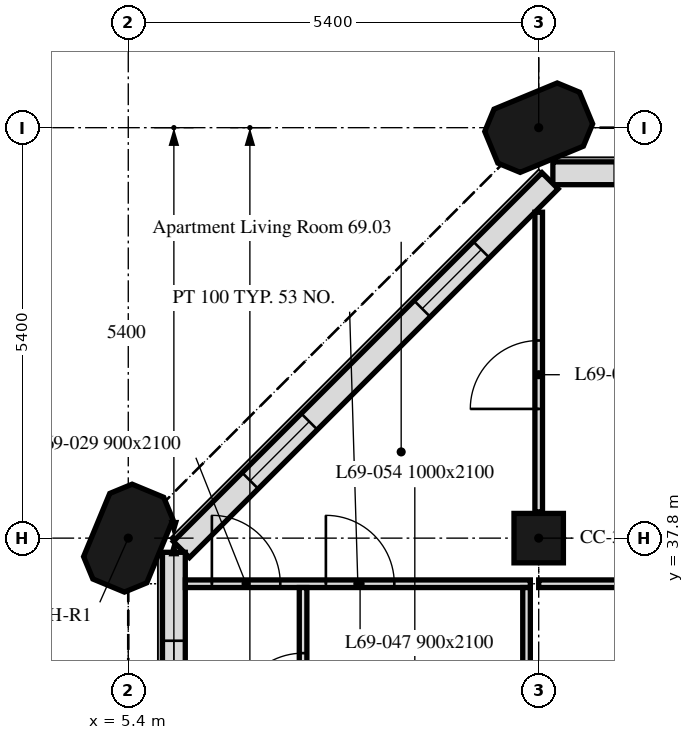
"""IFC4 building model, lengths in metres.
Left out: names, types, materials, properties, quantities, classifications, styles, units other than length and angle.
Written with IfcOpenShell. Run it as: python <this file> out.ifc"""

import sys

from ifc_helpers import new_model, si_unit, direction, frame, frame_2d, origin, origin_2d, place, context, subcontext, project, spatial, polyline, rectangle, outline, extrude, element, fill, save


model = new_model("IFC4")
c1 = context("Model", 3, precision=1e-05, world=origin(), true_north=direction((0.0, 1.0)))
c2 = subcontext(c1, "Body", "Model", "MODEL_VIEW")
j1 = project(units=[si_unit("LENGTHUNIT", "METRE"), si_unit("PLANEANGLEUNIT", "RADIAN")], contexts=[c1])
p1 = place(None, origin())
s1 = spatial("IfcSite", under=j1, at=p1, CompositionType="ELEMENT")
p2 = place(p1, origin())
s2 = spatial("IfcBuilding", under=s1, at=p2, CompositionType="ELEMENT")
p3 = place(p2, frame((0.0, 0.0, 281.8)))
s3 = spatial("IfcBuildingStorey", under=s2, at=p3, CompositionType="ELEMENT", Elevation=281.8)
p4 = place(p3, frame((5.4, 37.8, 0.0), z_axis=(0.0, 0.0, 1.0), x_axis=(0.382683432365, 0.923879532511, 0.0)))
e1 = element("IfcColumn", 1, at=p4, inside=s3, PredefinedType="COLUMN", context=c2, shape_type="SweptSolid", body=[
    extrude(outline(polyline([(-0.45, -0.45), (0.45, -0.45), (0.675, -0.225), (0.675, 0.225), (0.45, 0.45), (-0.45, 0.45), (-0.675, 0.225), (-0.675, -0.225), (-0.45, -0.45)])), origin(), (0.0, 0.0, 1.0), 3.0),
])
p5 = place(p3, frame((10.8, 37.8, 0.0), z_axis=(0.0, 0.0, 1.0), x_axis=(1.0, 0.0, 0.0)))
e2 = element("IfcColumn", 2, at=p5, inside=s3, PredefinedType="COLUMN", context=c2, shape_type="SweptSolid", body=[
    extrude(rectangle(XDim=0.65, YDim=0.65, at=origin_2d()), origin(), (0.0, 0.0, 1.0), 3.0),
])
p6 = place(p3, frame((10.8, 43.2, 0.0), z_axis=(0.0, 0.0, 1.0), x_axis=(0.923879532511, 0.382683432365, 0.0)))
e3 = element("IfcColumn", 3, at=p6, inside=s3, PredefinedType="COLUMN", context=c2, shape_type="SweptSolid", body=[
    extrude(outline(polyline([(-0.45, -0.45), (0.45, -0.45), (0.675, -0.225), (0.675, 0.225), (0.45, 0.45), (-0.45, 0.45), (-0.675, 0.225), (-0.675, -0.225), (-0.45, -0.45)])), origin(), (0.0, 0.0, 1.0), 3.0),
])
p7 = place(p3, frame((43.014, 42.6, 0.0), z_axis=(0.0, 0.0, 1.0), x_axis=(-1.0, 0.0, 0.0)))
e4 = element("IfcWall", 4, at=p7, inside=s3, PredefinedType="SOLIDWALL", context=c2, shape_type="SweptSolid", body=[
    extrude(rectangle(XDim=32.027, YDim=0.3, at=frame_2d((16.014, 0.0))), origin(), (0.0, 0.0, 1.0), 3.0),
])
p8 = place(p7, frame((2.764, 0.0, 0.9)))
e5 = element("IfcOpeningElement", 5, at=p8, cuts=e4, PredefinedType="OPENING", context=c2, shape_type="SweptSolid", body=[
    extrude(rectangle(XDim=1.1, YDim=1.7, at=frame_2d((0.55, 0.85))), frame((0.0, 0.16, 0.0), z_axis=(0.0, -1.0, 0.0), x_axis=(1.0, 0.0, 0.0)), (0.0, 0.0, 1.0), 0.32),
])
p9 = place(p7, frame((6.214, 0.0, 0.9)))
e6 = element("IfcOpeningElement", 6, at=p9, cuts=e4, PredefinedType="OPENING", context=c2, shape_type="SweptSolid", body=[
    extrude(rectangle(XDim=3.4, YDim=1.7, at=frame_2d((1.7, 0.85))), frame((0.0, 0.16, 0.0), z_axis=(0.0, -1.0, 0.0), x_axis=(1.0, 0.0, 0.0)), (0.0, 0.0, 1.0), 0.32),
])
p10 = place(p7, frame((13.564, 0.0, 0.9)))
e7 = element("IfcOpeningElement", 7, at=p10, cuts=e4, PredefinedType="OPENING", context=c2, shape_type="SweptSolid", body=[
    extrude(rectangle(XDim=1.1, YDim=1.7, at=frame_2d((0.55, 0.85))), frame((0.0, 0.16, 0.0), z_axis=(0.0, -1.0, 0.0), x_axis=(1.0, 0.0, 0.0)), (0.0, 0.0, 1.0), 0.32),
])
p11 = place(p7, frame((17.014, 0.0, 0.9)))
e8 = element("IfcOpeningElement", 8, at=p11, cuts=e4, PredefinedType="OPENING", context=c2, shape_type="SweptSolid", body=[
    extrude(rectangle(XDim=3.4, YDim=1.7, at=frame_2d((1.7, 0.85))), frame((0.0, 0.16, 0.0), z_axis=(0.0, -1.0, 0.0), x_axis=(1.0, 0.0, 0.0)), (0.0, 0.0, 1.0), 0.32),
])
p12 = place(p7, frame((24.364, 0.0, 0.9)))
e9 = element("IfcOpeningElement", 9, at=p12, cuts=e4, PredefinedType="OPENING", context=c2, shape_type="SweptSolid", body=[
    extrude(rectangle(XDim=1.1, YDim=1.7, at=frame_2d((0.55, 0.85))), frame((0.0, 0.16, 0.0), z_axis=(0.0, -1.0, 0.0), x_axis=(1.0, 0.0, 0.0)), (0.0, 0.0, 1.0), 0.32),
])
p13 = place(p7, frame((27.814, 0.0, 0.9)))
e10 = element("IfcOpeningElement", 10, at=p13, cuts=e4, PredefinedType="OPENING", context=c2, shape_type="SweptSolid", body=[
    extrude(rectangle(XDim=3.4, YDim=1.7, at=frame_2d((1.7, 0.85))), frame((0.0, 0.16, 0.0), z_axis=(0.0, -1.0, 0.0), x_axis=(1.0, 0.0, 0.0)), (0.0, 0.0, 1.0), 0.32),
])
p14 = place(p3, frame((10.949, 42.501, 0.0), z_axis=(0.0, 0.0, 1.0), x_axis=(-0.707106781187, -0.707106781187, 0.0)))
e11 = element("IfcWall", 11, at=p14, inside=s3, PredefinedType="SOLIDWALL", context=c2, shape_type="SweptSolid", body=[
    extrude(rectangle(XDim=6.86, YDim=0.3, at=frame_2d((3.43, 0.0))), origin(), (0.0, 0.0, 1.0), 3.0),
])
p15 = place(p14, frame((1.28, 0.0, 0.9)))
e12 = element("IfcOpeningElement", 12, at=p15, cuts=e11, PredefinedType="OPENING", context=c2, shape_type="SweptSolid", body=[
    extrude(rectangle(XDim=1.1, YDim=1.7, at=frame_2d((0.55, 0.85))), frame((0.0, 0.16, 0.0), z_axis=(0.0, -1.0, 0.0), x_axis=(1.0, 0.0, 0.0)), (0.0, 0.0, 1.0), 0.32),
])
p16 = place(p14, frame((4.48, 0.0, 0.9)))
e13 = element("IfcOpeningElement", 13, at=p16, cuts=e11, PredefinedType="OPENING", context=c2, shape_type="SweptSolid", body=[
    extrude(rectangle(XDim=1.1, YDim=1.7, at=frame_2d((0.55, 0.85))), frame((0.0, 0.16, 0.0), z_axis=(0.0, -1.0, 0.0), x_axis=(1.0, 0.0, 0.0)), (0.0, 0.0, 1.0), 0.32),
])
p17 = place(p3, frame((6.0, 37.614, 0.0), z_axis=(0.0, 0.0, 1.0), x_axis=(0.0, -1.0, 0.0)))
e14 = element("IfcWall", 14, at=p17, inside=s3, PredefinedType="SOLIDWALL", context=c2, shape_type="SweptSolid", body=[
    extrude(rectangle(XDim=5.214, YDim=0.3, at=frame_2d((2.607, 0.0))), origin(), (0.0, 0.0, 1.0), 3.0),
])
p18 = place(p17, frame((1.164, 0.0, 0.9)))
e15 = element("IfcOpeningElement", 15, at=p18, cuts=e14, PredefinedType="OPENING", context=c2, shape_type="SweptSolid", body=[
    extrude(rectangle(XDim=1.1, YDim=1.7, at=frame_2d((0.55, 0.85))), frame((0.0, 0.16, 0.0), z_axis=(0.0, -1.0, 0.0), x_axis=(1.0, 0.0, 0.0)), (0.0, 0.0, 1.0), 0.32),
])
p19 = place(p17, frame((3.139, 0.0, 0.9)))
e16 = element("IfcOpeningElement", 16, at=p19, cuts=e14, PredefinedType="OPENING", context=c2, shape_type="SweptSolid", body=[
    extrude(rectangle(XDim=0.65, YDim=1.7, at=frame_2d((0.325, 0.85))), frame((0.0, 0.16, 0.0), z_axis=(0.0, -1.0, 0.0), x_axis=(1.0, 0.0, 0.0)), (0.0, 0.0, 1.0), 0.32),
])
p20 = place(p3, frame((6.151, 37.2, 0.0), z_axis=(0.0, 0.0, 1.0), x_axis=(1.0, 0.0, 0.0)))
e17 = element("IfcWall", 17, at=p20, inside=s3, PredefinedType="PARTITIONING", context=c2, shape_type="SweptSolid", body=[
    extrude(rectangle(XDim=4.539, YDim=0.1, at=frame_2d((2.27, 0.0))), origin(), (0.0, 0.0, 1.0), 3.0),
])
p21 = place(p20, frame((0.349, 0.0, 0.0)))
e18 = element("IfcOpeningElement", 18, at=p21, cuts=e17, PredefinedType="OPENING", context=c2, shape_type="SweptSolid", body=[
    extrude(rectangle(XDim=0.9, YDim=2.1, at=frame_2d((0.45, 1.05))), frame((0.0, 0.05, 0.0), z_axis=(0.0, -1.0, 0.0), x_axis=(1.0, 0.0, 0.0)), (0.0, 0.0, 1.0), 0.1),
])
p22 = place(p20, frame((1.849, 0.0, 0.0)))
e19 = element("IfcOpeningElement", 19, at=p22, cuts=e17, PredefinedType="OPENING", context=c2, shape_type="SweptSolid", body=[
    extrude(rectangle(XDim=0.9, YDim=2.1, at=frame_2d((0.45, 1.05))), frame((0.0, 0.05, 0.0), z_axis=(0.0, -1.0, 0.0), x_axis=(1.0, 0.0, 0.0)), (0.0, 0.0, 1.0), 0.1),
])
p23 = place(p3, frame((10.8, 38.145, 0.0), z_axis=(0.0, 0.0, 1.0), x_axis=(0.0, 1.0, 0.0)))
e20 = element("IfcWall", 20, at=p23, inside=s3, PredefinedType="PARTITIONING", context=c2, shape_type="SweptSolid", body=[
    extrude(rectangle(XDim=3.943, YDim=0.1, at=frame_2d((1.971, 0.0))), origin(), (0.0, 0.0, 1.0), 3.0),
])
p24 = place(p23, frame((1.355, 0.0, 0.0)))
e21 = element("IfcOpeningElement", 21, at=p24, cuts=e20, PredefinedType="OPENING", context=c2, shape_type="SweptSolid", body=[
    extrude(rectangle(XDim=0.9, YDim=2.1, at=frame_2d((0.45, 1.05))), frame((0.0, 0.05, 0.0), z_axis=(0.0, -1.0, 0.0), x_axis=(1.0, 0.0, 0.0)), (0.0, 0.0, 1.0), 0.1),
])
p25 = place(p3, frame((7.7, 34.725, 0.0), z_axis=(0.0, 0.0, 1.0), x_axis=(0.0, 1.0, 0.0)))
e22 = element("IfcWall", 22, at=p25, inside=s3, PredefinedType="PARTITIONING", context=c2, shape_type="SweptSolid", body=[
    extrude(rectangle(XDim=2.425, YDim=0.1, at=frame_2d((1.212, 0.0))), origin(), (0.0, 0.0, 1.0), 3.0),
])
p26 = place(p25, frame((0.662, 0.0, 0.0)))
e23 = element("IfcOpeningElement", 23, at=p26, cuts=e22, PredefinedType="OPENING", context=c2, shape_type="SweptSolid", body=[
    extrude(rectangle(XDim=0.9, YDim=2.1, at=frame_2d((0.45, 1.05))), frame((0.0, 0.05, 0.0), z_axis=(0.0, -1.0, 0.0), x_axis=(1.0, 0.0, 0.0)), (0.0, 0.0, 1.0), 0.1),
])
p27 = place(p3, frame((10.64, 34.725, 0.0), z_axis=(0.0, 0.0, 1.0), x_axis=(0.0, 1.0, 0.0)))
e24 = element("IfcWall", 24, at=p27, inside=s3, PredefinedType="PARTITIONING", context=c2, shape_type="SweptSolid", body=[
    extrude(rectangle(XDim=2.425, YDim=0.1, at=frame_2d((1.212, 0.0))), origin(), (0.0, 0.0, 1.0), 3.0),
])
p28 = place(p27, frame((0.25, 0.0, 0.0)))
e25 = element("IfcOpeningElement", 25, at=p28, cuts=e24, PredefinedType="OPENING", context=c2, shape_type="SweptSolid", body=[
    extrude(rectangle(XDim=0.9, YDim=2.1, at=frame_2d((0.45, 1.05))), frame((0.0, 0.05, 0.0), z_axis=(0.0, -1.0, 0.0), x_axis=(1.0, 0.0, 0.0)), (0.0, 0.0, 1.0), 0.1),
])
p29 = place(p3, frame((10.8, 37.2, 0.0), z_axis=(0.0, 0.0, 1.0), x_axis=(1.0, 0.0, 0.0)))
e26 = element("IfcWall", 26, at=p29, inside=s3, PredefinedType="PARTITIONING", context=c2, shape_type="SweptSolid", body=[
    extrude(rectangle(XDim=16.2, YDim=0.1, at=frame_2d((8.1, 0.0))), origin(), (0.0, 0.0, 1.0), 3.0),
])
p30 = place(p29, frame((2.995, 0.0, 0.0)))
e27 = element("IfcOpeningElement", 27, at=p30, cuts=e26, PredefinedType="OPENING", context=c2, shape_type="SweptSolid", body=[
    extrude(rectangle(XDim=0.9, YDim=2.1, at=frame_2d((0.45, 1.05))), frame((0.0, 0.05, 0.0), z_axis=(0.0, -1.0, 0.0), x_axis=(1.0, 0.0, 0.0)), (0.0, 0.0, 1.0), 0.1),
])
p31 = place(p29, frame((13.996, 0.0, 0.0)))
e28 = element("IfcOpeningElement", 28, at=p31, cuts=e26, PredefinedType="OPENING", context=c2, shape_type="SweptSolid", body=[
    extrude(rectangle(XDim=0.9, YDim=2.1, at=frame_2d((0.45, 1.05))), frame((0.0, 0.05, 0.0), z_axis=(0.0, -1.0, 0.0), x_axis=(1.0, 0.0, 0.0)), (0.0, 0.0, 1.0), 0.1),
])
p32 = place(p29, frame((6.928, 0.0, 0.0)))
e29 = element("IfcOpeningElement", 29, at=p32, cuts=e26, PredefinedType="OPENING", context=c2, shape_type="SweptSolid", body=[
    extrude(rectangle(XDim=0.9, YDim=2.1, at=frame_2d((0.45, 1.05))), frame((0.0, 0.05, 0.0), z_axis=(0.0, -1.0, 0.0), x_axis=(1.0, 0.0, 0.0)), (0.0, 0.0, 1.0), 0.1),
])
p33 = place(p29, frame((8.428, 0.0, 0.0)))
e30 = element("IfcOpeningElement", 30, at=p33, cuts=e26, PredefinedType="OPENING", context=c2, shape_type="SweptSolid", body=[
    extrude(rectangle(XDim=0.9, YDim=2.1, at=frame_2d((0.45, 1.05))), frame((0.0, 0.05, 0.0), z_axis=(0.0, -1.0, 0.0), x_axis=(1.0, 0.0, 0.0)), (0.0, 0.0, 1.0), 0.1),
])
p34 = place(p15, origin())
e31 = element("IfcWindow", 31, at=p34, inside=s3, PartitioningType="SINGLE_PANEL", PredefinedType="WINDOW", context=c2, shape_type="SweptSolid", body=[
    extrude(rectangle(XDim=1.1, YDim=1.7, at=frame_2d((0.55, 0.85))), frame((0.0, 0.03, 0.0), z_axis=(0.0, -1.0, 0.0), x_axis=(1.0, 0.0, 0.0)), (0.0, 0.0, 1.0), 0.06),
])
fill(e12, e31)
p35 = place(p16, origin())
e32 = element("IfcWindow", 32, at=p35, inside=s3, PartitioningType="SINGLE_PANEL", PredefinedType="WINDOW", context=c2, shape_type="SweptSolid", body=[
    extrude(rectangle(XDim=1.1, YDim=1.7, at=frame_2d((0.55, 0.85))), frame((0.0, 0.03, 0.0), z_axis=(0.0, -1.0, 0.0), x_axis=(1.0, 0.0, 0.0)), (0.0, 0.0, 1.0), 0.06),
])
fill(e13, e32)
p36 = place(p18, origin())
e33 = element("IfcWindow", 33, at=p36, inside=s3, PartitioningType="SINGLE_PANEL", PredefinedType="WINDOW", context=c2, shape_type="SweptSolid", body=[
    extrude(rectangle(XDim=1.1, YDim=1.7, at=frame_2d((0.55, 0.85))), frame((0.0, 0.03, 0.0), z_axis=(0.0, -1.0, 0.0), x_axis=(1.0, 0.0, 0.0)), (0.0, 0.0, 1.0), 0.06),
])
fill(e15, e33)
p37 = place(p24, origin())
e34 = element("IfcDoor", 34, at=p37, inside=s3, OperationType="SINGLE_SWING_LEFT", PredefinedType="DOOR", context=c2, shape_type="SweptSolid", body=[
    extrude(rectangle(XDim=0.9, YDim=2.1, at=frame_2d((0.45, 1.05))), frame((0.0, 0.025, 0.0), z_axis=(0.0, -1.0, 0.0), x_axis=(1.0, 0.0, 0.0)), (0.0, 0.0, 1.0), 0.05),
])
fill(e21, e34)
p38 = place(p21, origin())
e35 = element("IfcDoor", 35, at=p38, inside=s3, OperationType="SINGLE_SWING_LEFT", PredefinedType="DOOR", context=c2, shape_type="SweptSolid", body=[
    extrude(rectangle(XDim=0.9, YDim=2.1, at=frame_2d((0.45, 1.05))), frame((0.0, 0.025, 0.0), z_axis=(0.0, -1.0, 0.0), x_axis=(1.0, 0.0, 0.0)), (0.0, 0.0, 1.0), 0.05),
])
fill(e18, e35)
p39 = place(p26, origin())
e36 = element("IfcDoor", 36, at=p39, inside=s3, OperationType="SINGLE_SWING_LEFT", PredefinedType="DOOR", context=c2, shape_type="SweptSolid", body=[
    extrude(rectangle(XDim=0.9, YDim=2.1, at=frame_2d((0.45, 1.05))), frame((0.0, 0.025, 0.0), z_axis=(0.0, -1.0, 0.0), x_axis=(1.0, 0.0, 0.0)), (0.0, 0.0, 1.0), 0.05),
])
fill(e23, e36)
p40 = place(p22, origin())
e37 = element("IfcDoor", 37, at=p40, inside=s3, OperationType="SINGLE_SWING_RIGHT", PredefinedType="DOOR", context=c2, shape_type="SweptSolid", body=[
    extrude(rectangle(XDim=0.9, YDim=2.1, at=frame_2d((0.45, 1.05))), frame((0.0, 0.025, 0.0), z_axis=(0.0, -1.0, 0.0), x_axis=(1.0, 0.0, 0.0)), (0.0, 0.0, 1.0), 0.05),
])
fill(e19, e37)
save(model, sys.argv[1])
